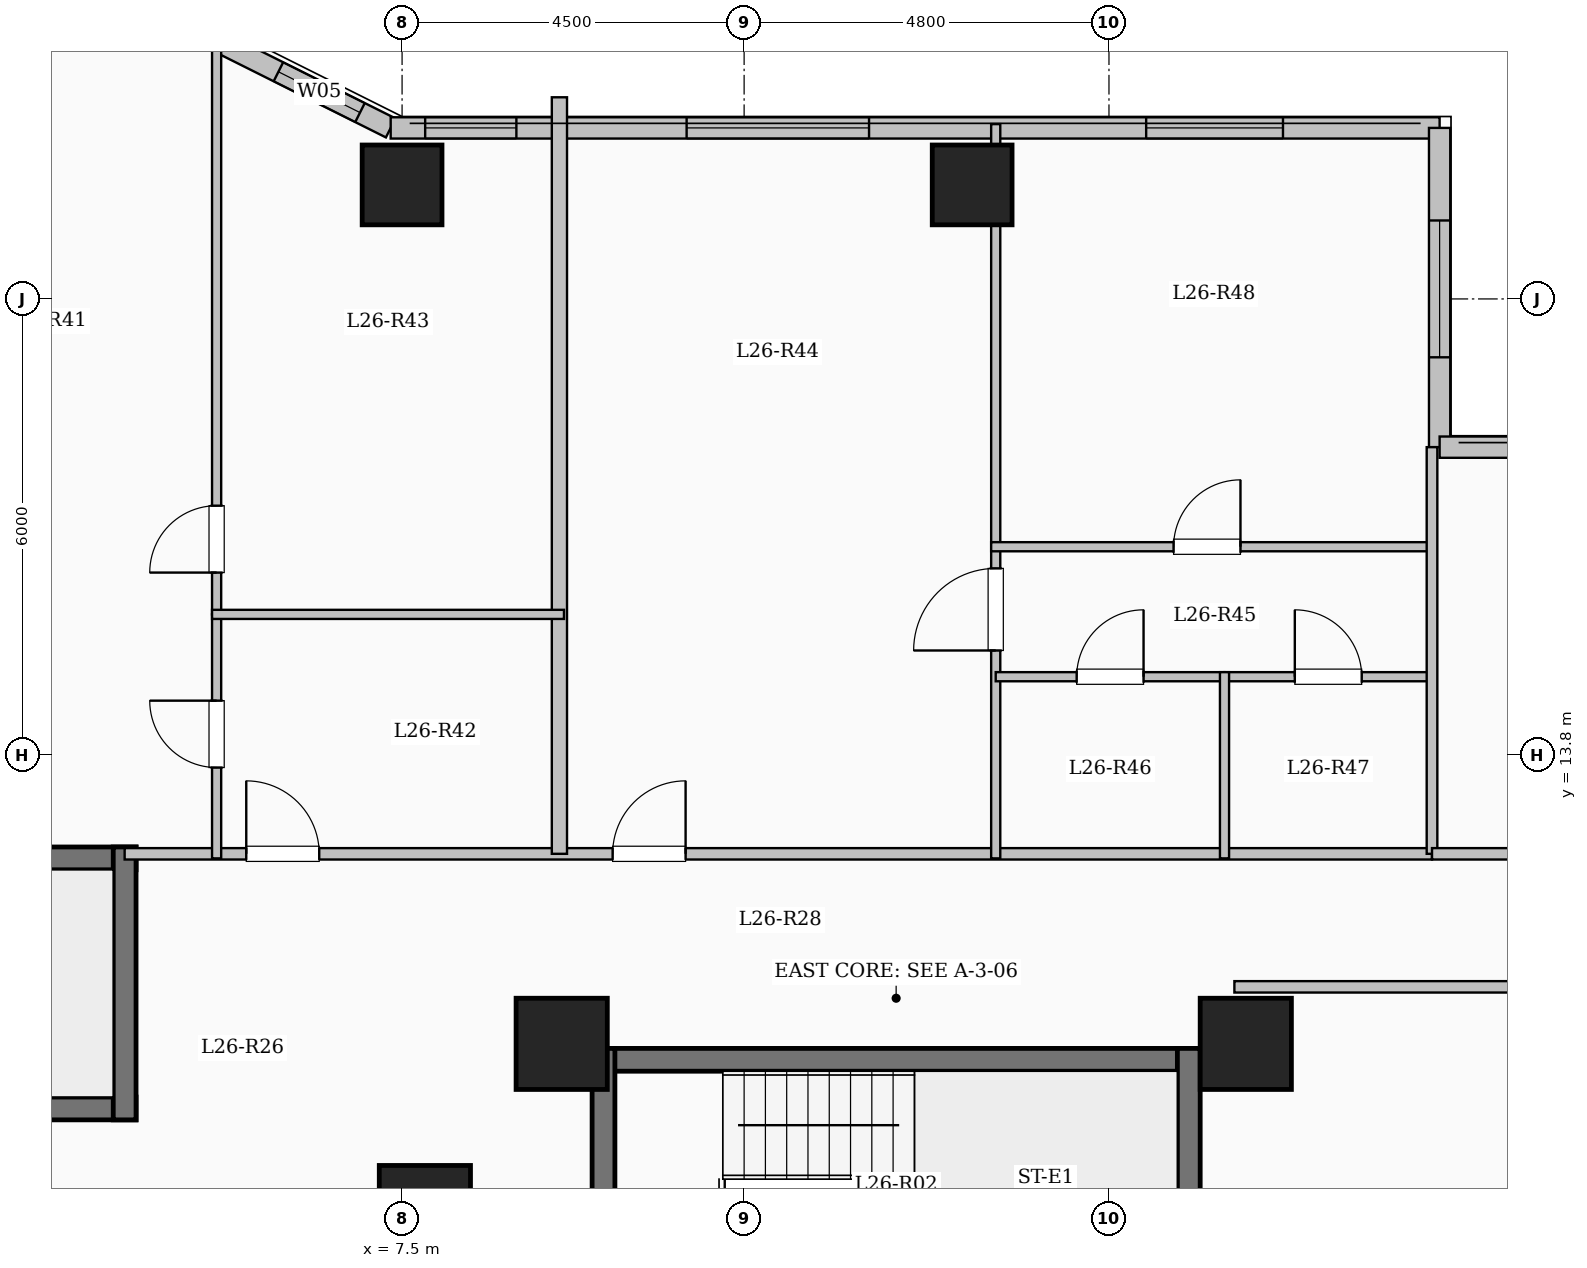
"""IFC4 building model, lengths in metres.
Left out: names, types, materials, properties, quantities, classifications, styles, units other than length and angle.
Written with IfcOpenShell. Run it as: python <this file> out.ifc"""

import sys

from ifc_helpers import new_model, si_unit, direction, frame, frame_2d, origin, origin_2d, place, context, subcontext, project, spatial, rectangle, extrude, element, fill, save


model = new_model("IFC4")
c1 = context("Model", 3, precision=1e-05, world=origin(), true_north=direction((0.0, 1.0)))
c2 = subcontext(c1, "Body", "Model", "MODEL_VIEW")
j1 = project(units=[si_unit("LENGTHUNIT", "METRE"), si_unit("PLANEANGLEUNIT", "RADIAN")], contexts=[c1])
p1 = place(None, origin())
s1 = spatial("IfcSite", under=j1, at=p1, CompositionType="ELEMENT")
p2 = place(p1, origin())
s2 = spatial("IfcBuilding", under=s1, at=p2, CompositionType="ELEMENT")
p3 = place(p2, frame((0.0, 0.0, 98.4)))
s3 = spatial("IfcBuildingStorey", under=s2, at=p3, CompositionType="ELEMENT", Elevation=98.4)
for number, where, z_axis, x_axis in (
    (1, (7.8, 7.8, 0.0), (0.0, 0.0, 1.0), (1.0, 0.0, 0.0)),
    (2, (9.6, 10.0, 0.0), (0.0, 0.0, 1.0), (1.0, 0.0, 0.0)),
    (3, (18.6, 10.0, 0.0), (0.0, 0.0, 1.0), (1.0, 0.0, 0.0)),
):
    element("IfcColumn", number, at=place(p3, frame(where, z_axis=z_axis, x_axis=x_axis)), inside=s3, PredefinedType="COLUMN", context=c2, shape_type="SweptSolid", body=[
        extrude(rectangle(XDim=1.2, YDim=1.2, at=origin_2d()), origin(), (0.0, 0.0, 1.0), 3.35),
    ])
for number, where, z_axis, x_axis in (
    (4, (7.5, 21.3, 0.0), (0.0, 0.0, 1.0), (1.0, 0.0, 0.0)),
    (5, (15.0, 21.3, 0.0), (0.0, 0.0, 1.0), (1.0, 0.0, 0.0)),
):
    element("IfcColumn", number, at=place(p3, frame(where, z_axis=z_axis, x_axis=x_axis)), inside=s3, PredefinedType="COLUMN", context=c2, shape_type="SweptSolid", body=[
        extrude(rectangle(XDim=1.05, YDim=1.05, at=origin_2d()), origin(), (0.0, 0.0, 1.0), 3.35),
    ])
p4 = place(p3, frame((4.35, 23.55, 0.0), z_axis=(0.0, 0.0, 1.0), x_axis=(0.894427191, -0.4472135955, 0.0)))
e6 = element("IfcWall", 6, at=p4, inside=s3, PredefinedType="SOLIDWALL", context=c2, shape_type="SweptSolid", body=[
    extrude(rectangle(XDim=3.354, YDim=0.28, at=frame_2d((1.677, 0.0))), origin(), (0.0, 0.0, 1.0), 3.1),
])
p5 = place(p4, frame((1.703, 0.0, 0.95)))
e7 = element("IfcOpeningElement", 7, at=p5, cuts=e6, PredefinedType="OPENING", context=c2, shape_type="SweptSolid", body=[
    extrude(rectangle(XDim=1.2, YDim=1.5, at=frame_2d((0.6, 0.75))), frame((0.0, 0.15, 0.0), z_axis=(0.0, -1.0, 0.0), x_axis=(1.0, 0.0, 0.0)), (0.0, 0.0, 1.0), 0.3),
])
p6 = place(p3, frame((7.35, 22.05, 0.0), z_axis=(0.0, 0.0, 1.0), x_axis=(1.0, 0.0, 0.0)))
e8 = element("IfcWall", 8, at=p6, inside=s3, PredefinedType="SOLIDWALL", context=c2, shape_type="SweptSolid", body=[
    extrude(rectangle(XDim=13.8, YDim=0.28, at=frame_2d((6.9, 0.0))), origin(), (0.0, 0.0, 1.0), 3.1),
])
p7 = place(p6, frame((0.454, 0.0, 0.95)))
e9 = element("IfcOpeningElement", 9, at=p7, cuts=e8, PredefinedType="OPENING", context=c2, shape_type="SweptSolid", body=[
    extrude(rectangle(XDim=1.2, YDim=1.5, at=frame_2d((0.6, 0.75))), frame((0.0, 0.15, 0.0), z_axis=(0.0, -1.0, 0.0), x_axis=(1.0, 0.0, 0.0)), (0.0, 0.0, 1.0), 0.3),
])
p8 = place(p6, frame((3.894, 0.0, 0.9)))
e10 = element("IfcOpeningElement", 10, at=p8, cuts=e8, PredefinedType="OPENING", context=c2, shape_type="SweptSolid", body=[
    extrude(rectangle(XDim=2.4, YDim=1.8, at=frame_2d((1.2, 0.9))), frame((0.0, 0.15, 0.0), z_axis=(0.0, -1.0, 0.0), x_axis=(1.0, 0.0, 0.0)), (0.0, 0.0, 1.0), 0.3),
])
p9 = place(p6, frame((9.939, 0.0, 0.9)))
e11 = element("IfcOpeningElement", 11, at=p9, cuts=e8, PredefinedType="OPENING", context=c2, shape_type="SweptSolid", body=[
    extrude(rectangle(XDim=1.8, YDim=1.65, at=frame_2d((0.9, 0.825))), frame((0.0, 0.15, 0.0), z_axis=(0.0, -1.0, 0.0), x_axis=(1.0, 0.0, 0.0)), (0.0, 0.0, 1.0), 0.3),
])
p10 = place(p3, frame((21.15, 22.05, 0.0), z_axis=(0.0, 0.0, 1.0), x_axis=(0.0, -1.0, 0.0)))
e12 = element("IfcWall", 12, at=p10, inside=s3, PredefinedType="SOLIDWALL", context=c2, shape_type="SweptSolid", body=[
    extrude(rectangle(XDim=4.2, YDim=0.28, at=frame_2d((2.1, 0.0))), origin(), (0.0, 0.0, 1.0), 3.1),
])
p11 = place(p10, frame((1.218, 0.0, 0.9)))
e13 = element("IfcOpeningElement", 13, at=p11, cuts=e12, PredefinedType="OPENING", context=c2, shape_type="SweptSolid", body=[
    extrude(rectangle(XDim=1.8, YDim=1.65, at=frame_2d((0.9, 0.825))), frame((0.0, 0.15, 0.0), z_axis=(0.0, -1.0, 0.0), x_axis=(1.0, 0.0, 0.0)), (0.0, 0.0, 1.0), 0.3),
])
p12 = place(p3, frame((21.15, 17.85, 0.0), z_axis=(0.0, 0.0, 1.0), x_axis=(1.0, 0.0, 0.0)))
e14 = element("IfcWall", 14, at=p12, inside=s3, PredefinedType="SOLIDWALL", context=c2, shape_type="SweptSolid", body=[
    extrude(rectangle(XDim=5.7, YDim=0.28, at=frame_2d((2.85, 0.0))), origin(), (0.0, 0.0, 1.0), 3.1),
])
p13 = place(p12, frame((1.825, 0.0, 0.9)))
e15 = element("IfcOpeningElement", 15, at=p13, cuts=e14, PredefinedType="OPENING", context=c2, shape_type="SweptSolid", body=[
    extrude(rectangle(XDim=2.0, YDim=1.7, at=frame_2d((1.0, 0.85))), frame((0.0, 0.15, 0.0), z_axis=(0.0, -1.0, 0.0), x_axis=(1.0, 0.0, 0.0)), (0.0, 0.0, 1.0), 0.3),
])
p14 = place(p3, frame((10.0, 9.79, 0.0), z_axis=(0.0, 0.0, 1.0), x_axis=(1.0, 0.0, 0.0)))
e16 = element("IfcWall", 16, at=p14, inside=s3, PredefinedType="SHEAR", context=c2, shape_type="SweptSolid", body=[
    extrude(rectangle(XDim=8.0, YDim=0.3, at=frame_2d((4.0, 0.0))), origin(), (0.0, 0.0, 1.0), 3.35),
])
for number, where, z_axis, x_axis in (
    (17, (10.15, 6.35, 0.0), (0.0, 0.0, 1.0), (0.0, 1.0, 0.0)),
    (18, (17.85, 6.35, 0.0), (0.0, 0.0, 1.0), (0.0, 1.0, 0.0)),
):
    element("IfcWall", number, at=place(p3, frame(where, z_axis=z_axis, x_axis=x_axis)), inside=s3, PredefinedType="SHEAR", context=c2, shape_type="SweptSolid", body=[
        extrude(rectangle(XDim=3.59, YDim=0.3, at=frame_2d((1.795, 0.0))), origin(), (0.0, 0.0, 1.0), 3.35),
    ])
p15 = place(p3, frame((-4.0, 12.44, 0.0), z_axis=(0.0, 0.0, 1.0), x_axis=(1.0, 0.0, 0.0)))
e19 = element("IfcWall", 19, at=p15, inside=s3, PredefinedType="SHEAR", context=c2, shape_type="SweptSolid", body=[
    extrude(rectangle(XDim=8.0, YDim=0.3, at=frame_2d((4.0, 0.0))), origin(), (0.0, 0.0, 1.0), 3.35),
])
p16 = place(p3, frame((-4.0, 9.15, 0.0), z_axis=(0.0, 0.0, 1.0), x_axis=(1.0, 0.0, 0.0)))
e20 = element("IfcWall", 20, at=p16, inside=s3, PredefinedType="SHEAR", context=c2, shape_type="SweptSolid", body=[
    extrude(rectangle(XDim=8.0, YDim=0.3, at=frame_2d((4.0, 0.0))), origin(), (0.0, 0.0, 1.0), 3.35),
])
p17 = place(p16, frame((0.55, 0.0, 0.0)))
e21 = element("IfcOpeningElement", 21, at=p17, cuts=e20, PredefinedType="OPENING", context=c2, shape_type="SweptSolid", body=[
    extrude(rectangle(XDim=1.0, YDim=2.15, at=frame_2d((0.5, 1.075))), frame((0.0, 0.16, 0.0), z_axis=(0.0, -1.0, 0.0), x_axis=(1.0, 0.0, 0.0)), (0.0, 0.0, 1.0), 0.32),
])
p18 = place(p3, frame((3.85, 9.0, 0.0), z_axis=(0.0, 0.0, 1.0), x_axis=(0.0, 1.0, 0.0)))
e22 = element("IfcWall", 22, at=p18, inside=s3, PredefinedType="SHEAR", context=c2, shape_type="SweptSolid", body=[
    extrude(rectangle(XDim=3.59, YDim=0.3, at=frame_2d((1.795, 0.0))), origin(), (0.0, 0.0, 1.0), 3.35),
])
p19 = place(p3, frame((3.85, 12.5, 0.0), z_axis=(0.0, 0.0, 1.0), x_axis=(1.0, 0.0, 0.0)))
e23 = element("IfcWall", 23, at=p19, inside=s3, PredefinedType="PARTITIONING", context=c2, shape_type="SweptSolid", body=[
    extrude(rectangle(XDim=17.2, YDim=0.15, at=frame_2d((8.6, 0.0))), origin(), (0.0, 0.0, 1.0), 3.1),
])
p20 = place(p19, frame((1.6, 0.0, 0.0)))
e24 = element("IfcOpeningElement", 24, at=p20, cuts=e23, PredefinedType="OPENING", context=c2, shape_type="SweptSolid", body=[
    extrude(rectangle(XDim=0.96, YDim=2.15, at=frame_2d((0.48, 1.075))), frame((0.0, 0.085, 0.0), z_axis=(0.0, -1.0, 0.0), x_axis=(1.0, 0.0, 0.0)), (0.0, 0.0, 1.0), 0.17),
])
p21 = place(p19, frame((6.42, 0.0, 0.0)))
e25 = element("IfcOpeningElement", 25, at=p21, cuts=e23, PredefinedType="OPENING", context=c2, shape_type="SweptSolid", body=[
    extrude(rectangle(XDim=0.96, YDim=2.15, at=frame_2d((0.48, 1.075))), frame((0.0, 0.085, 0.0), z_axis=(0.0, -1.0, 0.0), x_axis=(1.0, 0.0, 0.0)), (0.0, 0.0, 1.0), 0.17),
])
p22 = place(p3, frame((9.57, 12.5, 0.0), z_axis=(0.0, 0.0, 1.0), x_axis=(0.0, 1.0, 0.0)))
e26 = element("IfcWall", 26, at=p22, inside=s3, PredefinedType="SOLIDWALL", context=c2, shape_type="SweptSolid", body=[
    extrude(rectangle(XDim=9.953, YDim=0.2, at=frame_2d((4.977, 0.0))), origin(), (0.0, 0.0, 1.0), 3.1),
])
p23 = place(p3, frame((5.06, 12.44, 0.0), z_axis=(0.0, 0.0, 1.0), x_axis=(0.0, 1.0, 0.0)))
e27 = element("IfcWall", 27, at=p23, inside=s3, PredefinedType="PARTITIONING", context=c2, shape_type="SweptSolid", body=[
    extrude(rectangle(XDim=3.21, YDim=0.12, at=frame_2d((1.605, 0.0))), origin(), (0.0, 0.0, 1.0), 3.1),
])
p24 = place(p23, frame((1.195, 0.0, 0.0)))
e28 = element("IfcOpeningElement", 28, at=p24, cuts=e27, PredefinedType="OPENING", context=c2, shape_type="SweptSolid", body=[
    extrude(rectangle(XDim=0.88, YDim=2.1, at=frame_2d((0.44, 1.05))), frame((0.0, 0.07, 0.0), z_axis=(0.0, -1.0, 0.0), x_axis=(1.0, 0.0, 0.0)), (0.0, 0.0, 1.0), 0.14),
])
p25 = place(p3, frame((5.06, 15.65, 0.0), z_axis=(0.0, 0.0, 1.0), x_axis=(0.0, 1.0, 0.0)))
e29 = element("IfcWall", 29, at=p25, inside=s3, PredefinedType="PARTITIONING", context=c2, shape_type="SweptSolid", body=[
    extrude(rectangle(XDim=7.915, YDim=0.12, at=frame_2d((3.958, 0.0))), origin(), (0.0, 0.0, 1.0), 3.1),
])
p26 = place(p25, frame((0.55, 0.0, 0.0)))
e30 = element("IfcOpeningElement", 30, at=p26, cuts=e29, PredefinedType="OPENING", context=c2, shape_type="SweptSolid", body=[
    extrude(rectangle(XDim=0.88, YDim=2.1, at=frame_2d((0.44, 1.05))), frame((0.0, 0.07, 0.0), z_axis=(0.0, -1.0, 0.0), x_axis=(1.0, 0.0, 0.0)), (0.0, 0.0, 1.0), 0.14),
])
p27 = place(p3, frame((5.0, 15.65, 0.0), z_axis=(0.0, 0.0, 1.0), x_axis=(1.0, 0.0, 0.0)))
e31 = element("IfcWall", 31, at=p27, inside=s3, PredefinedType="PARTITIONING", context=c2, shape_type="SweptSolid", body=[
    extrude(rectangle(XDim=4.63, YDim=0.12, at=frame_2d((2.315, 0.0))), origin(), (0.0, 0.0, 1.0), 3.1),
])
p28 = place(p3, frame((15.31, 12.44, 0.0), z_axis=(0.0, 0.0, 1.0), x_axis=(0.0, 1.0, 0.0)))
e32 = element("IfcWall", 32, at=p28, inside=s3, PredefinedType="PARTITIONING", context=c2, shape_type="SweptSolid", body=[
    extrude(rectangle(XDim=9.66, YDim=0.12, at=frame_2d((4.83, 0.0))), origin(), (0.0, 0.0, 1.0), 2.435),
])
p29 = place(p28, frame((2.735, 0.0, 0.0)))
e33 = element("IfcOpeningElement", 33, at=p29, cuts=e32, PredefinedType="OPENING", context=c2, shape_type="SweptSolid", body=[
    extrude(rectangle(XDim=1.08, YDim=2.15, at=frame_2d((0.54, 1.075))), frame((0.0, 0.07, 0.0), z_axis=(0.0, -1.0, 0.0), x_axis=(1.0, 0.0, 0.0)), (0.0, 0.0, 1.0), 0.14),
])
p30 = place(p3, frame((15.31, 14.83, 0.0), z_axis=(0.0, 0.0, 1.0), x_axis=(1.0, 0.0, 0.0)))
e34 = element("IfcWall", 34, at=p30, inside=s3, PredefinedType="PARTITIONING", context=c2, shape_type="SweptSolid", body=[
    extrude(rectangle(XDim=3.01, YDim=0.12, at=frame_2d((1.505, 0.0))), origin(), (0.0, 0.0, 1.0), 3.1),
])
p31 = place(p30, frame((1.065, 0.0, 0.0)))
e35 = element("IfcOpeningElement", 35, at=p31, cuts=e34, PredefinedType="OPENING", context=c2, shape_type="SweptSolid", body=[
    extrude(rectangle(XDim=0.88, YDim=2.1, at=frame_2d((0.44, 1.05))), frame((0.0, 0.07, 0.0), z_axis=(0.0, -1.0, 0.0), x_axis=(1.0, 0.0, 0.0)), (0.0, 0.0, 1.0), 0.14),
])
p32 = place(p3, frame((18.32, 14.83, 0.0), z_axis=(0.0, 0.0, 1.0), x_axis=(1.0, 0.0, 0.0)))
e36 = element("IfcWall", 36, at=p32, inside=s3, PredefinedType="PARTITIONING", context=c2, shape_type="SweptSolid", body=[
    extrude(rectangle(XDim=2.73, YDim=0.12, at=frame_2d((1.365, 0.0))), origin(), (0.0, 0.0, 1.0), 3.1),
])
p33 = place(p32, frame((0.925, 0.0, 0.0)))
e37 = element("IfcOpeningElement", 37, at=p33, cuts=e36, PredefinedType="OPENING", context=c2, shape_type="SweptSolid", body=[
    extrude(rectangle(XDim=0.88, YDim=2.1, at=frame_2d((0.44, 1.05))), frame((0.0, 0.07, 0.0), z_axis=(0.0, -1.0, 0.0), x_axis=(1.0, 0.0, 0.0)), (0.0, 0.0, 1.0), 0.14),
])
p34 = place(p3, frame((15.25, 16.54, 0.0), z_axis=(0.0, 0.0, 1.0), x_axis=(1.0, 0.0, 0.0)))
e38 = element("IfcWall", 38, at=p34, inside=s3, PredefinedType="PARTITIONING", context=c2, shape_type="SweptSolid", body=[
    extrude(rectangle(XDim=5.86, YDim=0.12, at=frame_2d((2.93, 0.0))), origin(), (0.0, 0.0, 1.0), 3.1),
])
p35 = place(p34, frame((2.4, 0.0, 0.0)))
e39 = element("IfcOpeningElement", 39, at=p35, cuts=e38, PredefinedType="OPENING", context=c2, shape_type="SweptSolid", body=[
    extrude(rectangle(XDim=0.88, YDim=2.1, at=frame_2d((0.44, 1.05))), frame((0.0, 0.07, 0.0), z_axis=(0.0, -1.0, 0.0), x_axis=(1.0, 0.0, 0.0)), (0.0, 0.0, 1.0), 0.14),
])
p36 = place(p3, frame((18.32, 12.44, 0.0), z_axis=(0.0, 0.0, 1.0), x_axis=(0.0, 1.0, 0.0)))
e40 = element("IfcWall", 40, at=p36, inside=s3, PredefinedType="PARTITIONING", context=c2, shape_type="SweptSolid", body=[
    extrude(rectangle(XDim=2.45, YDim=0.12, at=frame_2d((1.225, 0.0))), origin(), (0.0, 0.0, 1.0), 3.1),
])
p37 = place(p3, frame((18.45, 10.75, 0.0), z_axis=(0.0, 0.0, 1.0), x_axis=(1.0, 0.0, 0.0)))
e41 = element("IfcWall", 41, at=p37, inside=s3, PredefinedType="PARTITIONING", context=c2, shape_type="SweptSolid", body=[
    extrude(rectangle(XDim=8.43, YDim=0.15, at=frame_2d((4.215, 0.0))), origin(), (0.0, 0.0, 1.0), 3.1),
])
p38 = place(p3, frame((21.05, 12.5, 0.0), z_axis=(0.0, 0.0, 1.0), x_axis=(0.0, 1.0, 0.0)))
e42 = element("IfcWall", 42, at=p38, inside=s3, PredefinedType="PARTITIONING", context=c2, shape_type="SweptSolid", body=[
    extrude(rectangle(XDim=5.35, YDim=0.14, at=frame_2d((2.675, 0.0))), origin(), (0.0, 0.0, 1.0), 3.1),
])
p39 = place(p3, frame((21.05, 12.5, 0.0), z_axis=(0.0, 0.0, 1.0), x_axis=(1.0, 0.0, 0.0)))
e43 = element("IfcWall", 43, at=p39, inside=s3, PredefinedType="PARTITIONING", context=c2, shape_type="SweptSolid", body=[
    extrude(rectangle(XDim=5.83, YDim=0.15, at=frame_2d((2.915, 0.0))), origin(), (0.0, 0.0, 1.0), 3.1),
])
p40 = place(p39, frame((2.44, 0.0, 0.0)))
e44 = element("IfcOpeningElement", 44, at=p40, cuts=e43, PredefinedType="OPENING", context=c2, shape_type="SweptSolid", body=[
    extrude(rectangle(XDim=0.95, YDim=2.15, at=frame_2d((0.475, 1.075))), frame((0.0, 0.085, 0.0), z_axis=(0.0, -1.0, 0.0), x_axis=(1.0, 0.0, 0.0)), (0.0, 0.0, 1.0), 0.17),
])
p41 = place(p5, origin())
e45 = element("IfcWindow", 45, at=p41, inside=s3, PartitioningType="SINGLE_PANEL", PredefinedType="WINDOW", context=c2, shape_type="SweptSolid", body=[
    extrude(rectangle(XDim=1.2, YDim=1.5, at=frame_2d((0.6, 0.75))), frame((0.0, 0.03, 0.0), z_axis=(0.0, -1.0, 0.0), x_axis=(1.0, 0.0, 0.0)), (0.0, 0.0, 1.0), 0.06),
])
fill(e7, e45)
p42 = place(p7, origin())
e46 = element("IfcWindow", 46, at=p42, inside=s3, PartitioningType="SINGLE_PANEL", PredefinedType="WINDOW", context=c2, shape_type="SweptSolid", body=[
    extrude(rectangle(XDim=1.2, YDim=1.5, at=frame_2d((0.6, 0.75))), frame((0.0, 0.03, 0.0), z_axis=(0.0, -1.0, 0.0), x_axis=(1.0, 0.0, 0.0)), (0.0, 0.0, 1.0), 0.06),
])
fill(e9, e46)
p43 = place(p8, origin())
e47 = element("IfcWindow", 47, at=p43, inside=s3, PartitioningType="SINGLE_PANEL", PredefinedType="WINDOW", context=c2, shape_type="SweptSolid", body=[
    extrude(rectangle(XDim=2.4, YDim=1.8, at=frame_2d((1.2, 0.9))), frame((0.0, 0.03, 0.0), z_axis=(0.0, -1.0, 0.0), x_axis=(1.0, 0.0, 0.0)), (0.0, 0.0, 1.0), 0.06),
])
fill(e10, e47)
p44 = place(p9, origin())
e48 = element("IfcWindow", 48, at=p44, inside=s3, PartitioningType="SINGLE_PANEL", PredefinedType="WINDOW", context=c2, shape_type="SweptSolid", body=[
    extrude(rectangle(XDim=1.8, YDim=1.65, at=frame_2d((0.9, 0.825))), frame((0.0, 0.03, 0.0), z_axis=(0.0, -1.0, 0.0), x_axis=(1.0, 0.0, 0.0)), (0.0, 0.0, 1.0), 0.06),
])
fill(e11, e48)
p45 = place(p11, origin())
e49 = element("IfcWindow", 49, at=p45, inside=s3, PartitioningType="SINGLE_PANEL", PredefinedType="WINDOW", context=c2, shape_type="SweptSolid", body=[
    extrude(rectangle(XDim=1.8, YDim=1.65, at=frame_2d((0.9, 0.825))), frame((0.0, 0.03, 0.0), z_axis=(0.0, -1.0, 0.0), x_axis=(1.0, 0.0, 0.0)), (0.0, 0.0, 1.0), 0.06),
])
fill(e13, e49)
p46 = place(p20, origin())
e50 = element("IfcDoor", 50, at=p46, inside=s3, OperationType="SINGLE_SWING_LEFT", PredefinedType="DOOR", context=c2, shape_type="SweptSolid", body=[
    extrude(rectangle(XDim=0.96, YDim=2.15, at=frame_2d((0.48, 1.075))), frame((0.0, 0.025, 0.0), z_axis=(0.0, -1.0, 0.0), x_axis=(1.0, 0.0, 0.0)), (0.0, 0.0, 1.0), 0.05),
])
fill(e24, e50)
p47 = place(p24, origin())
e51 = element("IfcDoor", 51, at=p47, inside=s3, OperationType="SINGLE_SWING_RIGHT", PredefinedType="DOOR", context=c2, shape_type="SweptSolid", body=[
    extrude(rectangle(XDim=0.88, YDim=2.1, at=frame_2d((0.44, 1.05))), frame((0.0, 0.025, 0.0), z_axis=(0.0, -1.0, 0.0), x_axis=(1.0, 0.0, 0.0)), (0.0, 0.0, 1.0), 0.05),
])
fill(e28, e51)
p48 = place(p26, origin())
e52 = element("IfcDoor", 52, at=p48, inside=s3, OperationType="SINGLE_SWING_LEFT", PredefinedType="DOOR", context=c2, shape_type="SweptSolid", body=[
    extrude(rectangle(XDim=0.88, YDim=2.1, at=frame_2d((0.44, 1.05))), frame((0.0, 0.025, 0.0), z_axis=(0.0, -1.0, 0.0), x_axis=(1.0, 0.0, 0.0)), (0.0, 0.0, 1.0), 0.05),
])
fill(e30, e52)
p49 = place(p21, origin())
e53 = element("IfcDoor", 53, at=p49, inside=s3, OperationType="SINGLE_SWING_RIGHT", PredefinedType="DOOR", context=c2, shape_type="SweptSolid", body=[
    extrude(rectangle(XDim=0.96, YDim=2.15, at=frame_2d((0.48, 1.075))), frame((0.0, 0.025, 0.0), z_axis=(0.0, -1.0, 0.0), x_axis=(1.0, 0.0, 0.0)), (0.0, 0.0, 1.0), 0.05),
])
fill(e25, e53)
p50 = place(p29, origin())
e54 = element("IfcDoor", 54, at=p50, inside=s3, OperationType="SINGLE_SWING_LEFT", PredefinedType="DOOR", context=c2, shape_type="SweptSolid", body=[
    extrude(rectangle(XDim=1.08, YDim=2.15, at=frame_2d((0.54, 1.075))), frame((0.0, 0.025, 0.0), z_axis=(0.0, -1.0, 0.0), x_axis=(1.0, 0.0, 0.0)), (0.0, 0.0, 1.0), 0.05),
])
fill(e33, e54)
p51 = place(p31, origin())
e55 = element("IfcDoor", 55, at=p51, inside=s3, OperationType="SINGLE_SWING_RIGHT", PredefinedType="DOOR", context=c2, shape_type="SweptSolid", body=[
    extrude(rectangle(XDim=0.88, YDim=2.1, at=frame_2d((0.44, 1.05))), frame((0.0, 0.025, 0.0), z_axis=(0.0, -1.0, 0.0), x_axis=(1.0, 0.0, 0.0)), (0.0, 0.0, 1.0), 0.05),
])
fill(e35, e55)
p52 = place(p33, origin())
e56 = element("IfcDoor", 56, at=p52, inside=s3, OperationType="SINGLE_SWING_LEFT", PredefinedType="DOOR", context=c2, shape_type="SweptSolid", body=[
    extrude(rectangle(XDim=0.88, YDim=2.1, at=frame_2d((0.44, 1.05))), frame((0.0, 0.025, 0.0), z_axis=(0.0, -1.0, 0.0), x_axis=(1.0, 0.0, 0.0)), (0.0, 0.0, 1.0), 0.05),
])
fill(e37, e56)
p53 = place(p35, origin())
e57 = element("IfcDoor", 57, at=p53, inside=s3, OperationType="SINGLE_SWING_RIGHT", PredefinedType="DOOR", context=c2, shape_type="SweptSolid", body=[
    extrude(rectangle(XDim=0.88, YDim=2.1, at=frame_2d((0.44, 1.05))), frame((0.0, 0.025, 0.0), z_axis=(0.0, -1.0, 0.0), x_axis=(1.0, 0.0, 0.0)), (0.0, 0.0, 1.0), 0.05),
])
fill(e39, e57)
save(model, sys.argv[1])
